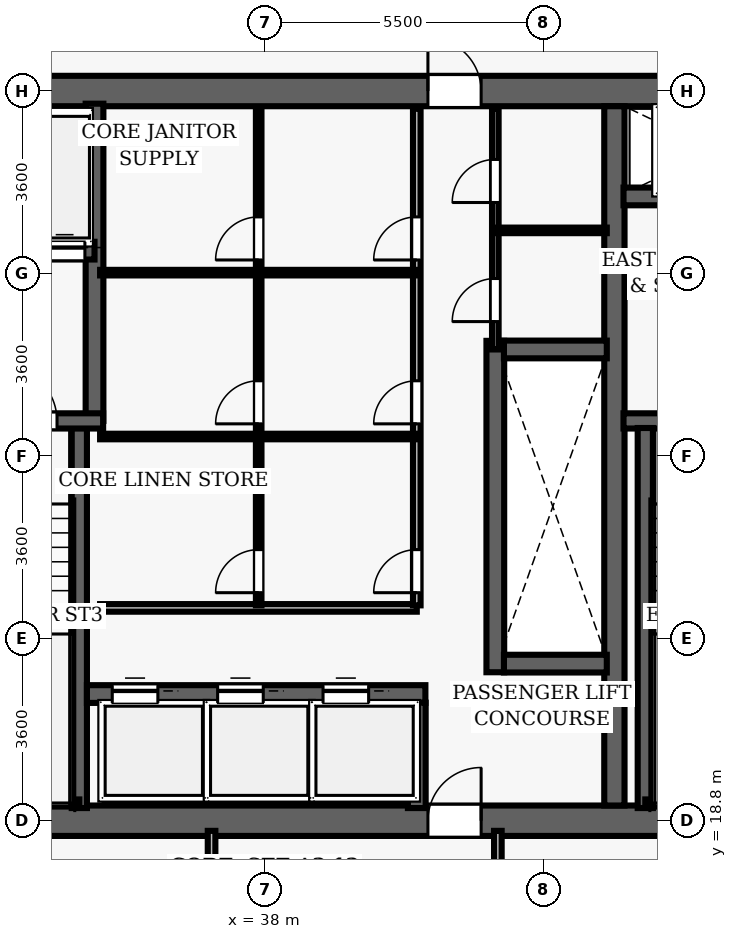
"""IFC4 building model, lengths in metres.
Left out: names, types, materials, properties, quantities, classifications, styles, units other than length and angle.
Written with IfcOpenShell. Run it as: python <this file> out.ifc"""

import sys

from ifc_helpers import new_model, si_unit, direction, frame, frame_2d, origin, place, context, subcontext, project, spatial, rectangle, extrude, element, fill, save


model = new_model("IFC4")
c1 = context("Model", 3, precision=1e-05, world=origin(), true_north=direction((0.0, 1.0)))
c2 = subcontext(c1, "Body", "Model", "MODEL_VIEW")
j1 = project(units=[si_unit("LENGTHUNIT", "METRE"), si_unit("PLANEANGLEUNIT", "RADIAN")], contexts=[c1])
p1 = place(None, origin())
s1 = spatial("IfcSite", under=j1, at=p1, CompositionType="ELEMENT")
p2 = place(p1, origin())
s2 = spatial("IfcBuilding", under=s1, at=p2, CompositionType="ELEMENT")
p3 = place(p2, frame((0.0, 0.0, 130.8)))
s3 = spatial("IfcBuildingStorey", under=s2, at=p3, CompositionType="ELEMENT", Elevation=130.8)
p4 = place(p3, frame((26.7, 18.8, 0.0), z_axis=(0.0, 0.0, 1.0), x_axis=(1.0, 0.0, 0.0)))
e1 = element("IfcWall", 1, at=p4, inside=s3, PredefinedType="SHEAR", context=c2, shape_type="SweptSolid", body=[
    extrude(rectangle(XDim=22.6, YDim=0.6, at=frame_2d((11.3, 0.0))), origin(), (0.0, 0.0, 1.0), 3.5),
])
p5 = place(p4, frame((14.52, 0.0, 0.0)))
e2 = element("IfcOpeningElement", 2, at=p5, cuts=e1, PredefinedType="OPENING", context=c2, shape_type="SweptSolid", body=[
    extrude(rectangle(XDim=1.05, YDim=2.15, at=frame_2d((0.525, 1.075))), frame((0.0, 0.31, 0.0), z_axis=(0.0, -1.0, 0.0), x_axis=(1.0, 0.0, 0.0)), (0.0, 0.0, 1.0), 0.62),
])
p6 = place(p3, frame((26.7, 33.2, 0.0), z_axis=(0.0, 0.0, 1.0), x_axis=(1.0, 0.0, 0.0)))
e3 = element("IfcWall", 3, at=p6, inside=s3, PredefinedType="SHEAR", context=c2, shape_type="SweptSolid", body=[
    extrude(rectangle(XDim=22.6, YDim=0.6, at=frame_2d((11.3, 0.0))), origin(), (0.0, 0.0, 1.0), 3.5),
])
p7 = place(p6, frame((4.62, 0.0, 0.0)))
e4 = element("IfcOpeningElement", 4, at=p7, cuts=e3, PredefinedType="OPENING", context=c2, shape_type="SweptSolid", body=[
    extrude(rectangle(XDim=1.05, YDim=2.15, at=frame_2d((0.525, 1.075))), frame((0.0, 0.31, 0.0), z_axis=(0.0, -1.0, 0.0), x_axis=(1.0, 0.0, 0.0)), (0.0, 0.0, 1.0), 0.62),
])
p8 = place(p6, frame((14.52, 0.0, 0.0)))
e5 = element("IfcOpeningElement", 5, at=p8, cuts=e3, PredefinedType="OPENING", context=c2, shape_type="SweptSolid", body=[
    extrude(rectangle(XDim=1.05, YDim=2.15, at=frame_2d((0.525, 1.075))), frame((0.0, 0.31, 0.0), z_axis=(0.0, -1.0, 0.0), x_axis=(1.0, 0.0, 0.0)), (0.0, 0.0, 1.0), 0.62),
])
p9 = place(p3, frame((44.9, 19.1, 0.0), z_axis=(0.0, 0.0, 1.0), x_axis=(0.0, 1.0, 0.0)))
e6 = element("IfcWall", 6, at=p9, inside=s3, PredefinedType="SHEAR", context=c2, shape_type="SweptSolid", body=[
    extrude(rectangle(XDim=13.8, YDim=0.4, at=frame_2d((6.9, 0.0))), origin(), (0.0, 0.0, 1.0), 3.5),
])
p10 = place(p3, frame((45.08, 26.69, 0.0), z_axis=(0.0, 0.0, 1.0), x_axis=(1.0, 0.0, 0.0)))
e7 = element("IfcWall", 7, at=p10, inside=s3, PredefinedType="SHEAR", context=c2, shape_type="SweptSolid", body=[
    extrude(rectangle(XDim=3.67, YDim=0.3, at=frame_2d((1.835, 0.0))), origin(), (0.0, 0.0, 1.0), 3.5),
])
p11 = place(p10, frame((1.05, 0.0, 0.0)))
e8 = element("IfcOpeningElement", 8, at=p11, cuts=e7, PredefinedType="OPENING", context=c2, shape_type="SweptSolid", body=[
    extrude(rectangle(XDim=1.1, YDim=2.15, at=frame_2d((0.55, 1.075))), frame((0.0, 0.16, 0.0), z_axis=(0.0, -1.0, 0.0), x_axis=(1.0, 0.0, 0.0)), (0.0, 0.0, 1.0), 0.32),
])
p12 = place(p3, frame((45.51, 19.05, 0.0), z_axis=(0.0, 0.0, 1.0), x_axis=(0.0, 1.0, 0.0)))
e9 = element("IfcWall", 9, at=p12, inside=s3, PredefinedType="SHEAR", context=c2, shape_type="SweptSolid", body=[
    extrude(rectangle(XDim=7.5, YDim=0.3, at=frame_2d((3.75, 0.0))), origin(), (0.0, 0.0, 1.0), 3.5),
])
p13 = place(p3, frame((45.51, 19.16, 0.0), z_axis=(0.0, 0.0, 1.0), x_axis=(1.0, 0.0, 0.0)))
e10 = element("IfcWall", 10, at=p13, inside=s3, PredefinedType="SHEAR", context=c2, shape_type="SweptSolid", body=[
    extrude(rectangle(XDim=3.095, YDim=0.12, at=frame_2d((1.547, 0.0))), origin(), (0.0, 0.0, 1.0), 3.5),
])
p14 = place(p3, frame((45.08, 31.12, 0.0), z_axis=(0.0, 0.0, 1.0), x_axis=(1.0, 0.0, 0.0)))
e11 = element("IfcWall", 11, at=p14, inside=s3, PredefinedType="SHEAR", context=c2, shape_type="SweptSolid", body=[
    extrude(rectangle(XDim=3.67, YDim=0.35, at=frame_2d((1.835, 0.0))), origin(), (0.0, 0.0, 1.0), 2.675),
])
p15 = place(p14, frame((1.25, 0.0, 0.0)))
e12 = element("IfcOpeningElement", 12, at=p15, cuts=e11, PredefinedType="OPENING", context=c2, shape_type="SweptSolid", body=[
    extrude(rectangle(XDim=1.1, YDim=2.15, at=frame_2d((0.55, 1.075))), frame((0.0, 0.185, 0.0), z_axis=(0.0, -1.0, 0.0), x_axis=(1.0, 0.0, 0.0)), (0.0, 0.0, 1.0), 0.37),
])
p16 = place(p3, frame((34.34, 19.05, 0.0), z_axis=(0.0, 0.0, 1.0), x_axis=(0.0, 1.0, 0.0)))
e13 = element("IfcWall", 13, at=p16, inside=s3, PredefinedType="SHEAR", context=c2, shape_type="SweptSolid", body=[
    extrude(rectangle(XDim=7.5, YDim=0.3, at=frame_2d((3.75, 0.0))), origin(), (0.0, 0.0, 1.0), 3.5),
])
p17 = place(p3, frame((34.64, 26.69, 0.0), z_axis=(0.0, 0.0, 1.0), x_axis=(0.0, 1.0, 0.0)))
e14 = element("IfcWall", 14, at=p17, inside=s3, PredefinedType="SHEAR", context=c2, shape_type="SweptSolid", body=[
    extrude(rectangle(XDim=6.26, YDim=0.35, at=frame_2d((3.13, 0.0))), origin(), (0.0, 0.0, 1.0), 3.5),
])
p18 = place(p3, frame((31.25, 26.69, 0.0), z_axis=(0.0, 0.0, 1.0), x_axis=(1.0, 0.0, 0.0)))
e15 = element("IfcWall", 15, at=p18, inside=s3, PredefinedType="SHEAR", context=c2, shape_type="SweptSolid", body=[
    extrude(rectangle(XDim=3.56, YDim=0.3, at=frame_2d((1.78, 0.0))), origin(), (0.0, 0.0, 1.0), 3.5),
])
p19 = place(p18, frame((1.55, 0.0, 0.0)))
e16 = element("IfcOpeningElement", 16, at=p19, cuts=e15, PredefinedType="OPENING", context=c2, shape_type="SweptSolid", body=[
    extrude(rectangle(XDim=1.1, YDim=2.15, at=frame_2d((0.55, 1.075))), frame((0.0, 0.16, 0.0), z_axis=(0.0, -1.0, 0.0), x_axis=(1.0, 0.0, 0.0)), (0.0, 0.0, 1.0), 0.32),
])
p20 = place(p3, frame((31.3, 19.16, 0.0), z_axis=(0.0, 0.0, 1.0), x_axis=(1.0, 0.0, 0.0)))
e17 = element("IfcWall", 17, at=p20, inside=s3, PredefinedType="SHEAR", context=c2, shape_type="SweptSolid", body=[
    extrude(rectangle(XDim=3.04, YDim=0.12, at=frame_2d((1.52, 0.0))), origin(), (0.0, 0.0, 1.0), 3.5),
])
p21 = place(p3, frame((32.23, 30.05, 0.0), z_axis=(0.0, 0.0, 1.0), x_axis=(1.0, 0.0, 0.0)))
e18 = element("IfcWall", 18, at=p21, inside=s3, PredefinedType="SHEAR", context=c2, shape_type="SweptSolid", body=[
    extrude(rectangle(XDim=2.41, YDim=0.35, at=frame_2d((1.205, 0.0))), origin(), (0.0, 0.0, 1.0), 2.675),
])
p22 = place(p21, frame((0.42, 0.0, 0.0)))
e19 = element("IfcOpeningElement", 19, at=p22, cuts=e18, PredefinedType="OPENING", context=c2, shape_type="SweptSolid", body=[
    extrude(rectangle(XDim=0.8, YDim=2.15, at=frame_2d((0.4, 1.075))), frame((0.0, 0.185, 0.0), z_axis=(0.0, -1.0, 0.0), x_axis=(1.0, 0.0, 0.0)), (0.0, 0.0, 1.0), 0.37),
])
p23 = place(p21, frame((1.42, 0.0, 0.0)))
e20 = element("IfcOpeningElement", 20, at=p23, cuts=e18, PredefinedType="OPENING", context=c2, shape_type="SweptSolid", body=[
    extrude(rectangle(XDim=0.8, YDim=2.15, at=frame_2d((0.4, 1.075))), frame((0.0, 0.185, 0.0), z_axis=(0.0, -1.0, 0.0), x_axis=(1.0, 0.0, 0.0)), (0.0, 0.0, 1.0), 0.37),
])
p24 = place(p3, frame((42.55, 21.73, 0.0), z_axis=(0.0, 0.0, 1.0), x_axis=(0.0, 1.0, 0.0)))
e21 = element("IfcWall", 21, at=p24, inside=s3, PredefinedType="SHEAR", context=c2, shape_type="SweptSolid", body=[
    extrude(rectangle(XDim=6.54, YDim=0.35, at=frame_2d((3.27, 0.0))), origin(), (0.0, 0.0, 1.0), 2.675),
])
for number, where, z_axis, x_axis in (
    (22, (42.72, 21.9, 0.0), (0.0, 0.0, 1.0), (1.0, 0.0, 0.0)),
    (23, (42.72, 28.1, 0.0), (0.0, 0.0, 1.0), (1.0, 0.0, 0.0)),
):
    element("IfcWall", number, at=place(p3, frame(where, z_axis=z_axis, x_axis=x_axis)), inside=s3, PredefinedType="SHEAR", context=c2, shape_type="SweptSolid", body=[
        extrude(rectangle(XDim=2.03, YDim=0.35, at=frame_2d((1.015, 0.0))), origin(), (0.0, 0.0, 1.0), 2.675),
    ])
p25 = place(p3, frame((34.49, 21.3, 0.0), z_axis=(0.0, 0.0, 1.0), x_axis=(1.0, 0.0, 0.0)))
e24 = element("IfcWall", 24, at=p25, inside=s3, PredefinedType="SHEAR", context=c2, shape_type="SweptSolid", body=[
    extrude(rectangle(XDim=6.68, YDim=0.35, at=frame_2d((3.34, 0.0))), origin(), (0.0, 0.0, 1.0), 2.675),
])
p26 = place(p25, frame((0.5, 0.0, 0.0)))
e25 = element("IfcOpeningElement", 25, at=p26, cuts=e24, PredefinedType="OPENING", context=c2, shape_type="SweptSolid", body=[
    extrude(rectangle(XDim=0.9, YDim=2.15, at=frame_2d((0.45, 1.075))), frame((0.0, 0.185, 0.0), z_axis=(0.0, -1.0, 0.0), x_axis=(1.0, 0.0, 0.0)), (0.0, 0.0, 1.0), 0.37),
])
p27 = place(p25, frame((2.58, 0.0, 0.0)))
e26 = element("IfcOpeningElement", 26, at=p27, cuts=e24, PredefinedType="OPENING", context=c2, shape_type="SweptSolid", body=[
    extrude(rectangle(XDim=0.9, YDim=2.15, at=frame_2d((0.45, 1.075))), frame((0.0, 0.185, 0.0), z_axis=(0.0, -1.0, 0.0), x_axis=(1.0, 0.0, 0.0)), (0.0, 0.0, 1.0), 0.37),
])
p28 = place(p25, frame((4.66, 0.0, 0.0)))
e27 = element("IfcOpeningElement", 27, at=p28, cuts=e24, PredefinedType="OPENING", context=c2, shape_type="SweptSolid", body=[
    extrude(rectangle(XDim=0.9, YDim=2.15, at=frame_2d((0.45, 1.075))), frame((0.0, 0.185, 0.0), z_axis=(0.0, -1.0, 0.0), x_axis=(1.0, 0.0, 0.0)), (0.0, 0.0, 1.0), 0.37),
])
p29 = place(p3, frame((41.0, 19.05, 0.0), z_axis=(0.0, 0.0, 1.0), x_axis=(0.0, 1.0, 0.0)))
e28 = element("IfcWall", 28, at=p29, inside=s3, PredefinedType="SHEAR", context=c2, shape_type="SweptSolid", body=[
    extrude(rectangle(XDim=2.08, YDim=0.35, at=frame_2d((1.04, 0.0))), origin(), (0.0, 0.0, 1.0), 2.675),
])
p30 = place(p3, frame((34.75, 23.0, 0.0), z_axis=(0.0, 0.0, 1.0), x_axis=(1.0, 0.0, 0.0)))
e29 = element("IfcWall", 29, at=p30, inside=s3, PredefinedType="PARTITIONING", context=c2, shape_type="SweptSolid", body=[
    extrude(rectangle(XDim=6.25, YDim=0.15, at=frame_2d((3.125, 0.0))), origin(), (0.0, 0.0, 1.0), 2.675),
])
p31 = place(p3, frame((41.0, 23.05, 0.0), z_axis=(0.0, 0.0, 1.0), x_axis=(0.0, 1.0, 0.0)))
e30 = element("IfcWall", 30, at=p31, inside=s3, PredefinedType="PARTITIONING", context=c2, shape_type="SweptSolid", body=[
    extrude(rectangle(XDim=9.8, YDim=0.15, at=frame_2d((4.9, 0.0))), origin(), (0.0, 0.0, 1.0), 2.675),
])
p32 = place(p31, frame((0.25, 0.0, 0.0)))
e31 = element("IfcOpeningElement", 31, at=p32, cuts=e30, PredefinedType="OPENING", context=c2, shape_type="SweptSolid", body=[
    extrude(rectangle(XDim=0.85, YDim=2.1, at=frame_2d((0.425, 1.05))), frame((0.0, 0.085, 0.0), z_axis=(0.0, -1.0, 0.0), x_axis=(1.0, 0.0, 0.0)), (0.0, 0.0, 1.0), 0.17),
])
p33 = place(p31, frame((3.582, 0.0, 0.0)))
e32 = element("IfcOpeningElement", 32, at=p33, cuts=e30, PredefinedType="OPENING", context=c2, shape_type="SweptSolid", body=[
    extrude(rectangle(XDim=0.85, YDim=2.1, at=frame_2d((0.425, 1.05))), frame((0.0, 0.085, 0.0), z_axis=(0.0, -1.0, 0.0), x_axis=(1.0, 0.0, 0.0)), (0.0, 0.0, 1.0), 0.17),
])
p34 = place(p31, frame((6.816, 0.0, 0.0)))
e33 = element("IfcOpeningElement", 33, at=p34, cuts=e30, PredefinedType="OPENING", context=c2, shape_type="SweptSolid", body=[
    extrude(rectangle(XDim=0.85, YDim=2.1, at=frame_2d((0.425, 1.05))), frame((0.0, 0.085, 0.0), z_axis=(0.0, -1.0, 0.0), x_axis=(1.0, 0.0, 0.0)), (0.0, 0.0, 1.0), 0.17),
])
p35 = place(p3, frame((37.88, 23.05, 0.0), z_axis=(0.0, 0.0, 1.0), x_axis=(0.0, 1.0, 0.0)))
e34 = element("IfcWall", 34, at=p35, inside=s3, PredefinedType="PARTITIONING", context=c2, shape_type="SweptSolid", body=[
    extrude(rectangle(XDim=9.8, YDim=0.11, at=frame_2d((4.9, 0.0))), origin(), (0.0, 0.0, 1.0), 2.675),
])
p36 = place(p35, frame((0.25, 0.0, 0.0)))
e35 = element("IfcOpeningElement", 35, at=p36, cuts=e34, PredefinedType="OPENING", context=c2, shape_type="SweptSolid", body=[
    extrude(rectangle(XDim=0.85, YDim=2.1, at=frame_2d((0.425, 1.05))), frame((0.0, 0.065, 0.0), z_axis=(0.0, -1.0, 0.0), x_axis=(1.0, 0.0, 0.0)), (0.0, 0.0, 1.0), 0.13),
])
p37 = place(p35, frame((3.582, 0.0, 0.0)))
e36 = element("IfcOpeningElement", 36, at=p37, cuts=e34, PredefinedType="OPENING", context=c2, shape_type="SweptSolid", body=[
    extrude(rectangle(XDim=0.85, YDim=2.1, at=frame_2d((0.425, 1.05))), frame((0.0, 0.065, 0.0), z_axis=(0.0, -1.0, 0.0), x_axis=(1.0, 0.0, 0.0)), (0.0, 0.0, 1.0), 0.13),
])
p38 = place(p35, frame((6.816, 0.0, 0.0)))
e37 = element("IfcOpeningElement", 37, at=p38, cuts=e34, PredefinedType="OPENING", context=c2, shape_type="SweptSolid", body=[
    extrude(rectangle(XDim=0.85, YDim=2.1, at=frame_2d((0.425, 1.05))), frame((0.0, 0.065, 0.0), z_axis=(0.0, -1.0, 0.0), x_axis=(1.0, 0.0, 0.0)), (0.0, 0.0, 1.0), 0.13),
])
for number, where, z_axis, x_axis in (
    (38, (34.75, 26.382, 0.0), (0.0, 0.0, 1.0), (1.0, 0.0, 0.0)),
    (39, (34.75, 29.616, 0.0), (0.0, 0.0, 1.0), (1.0, 0.0, 0.0)),
):
    element("IfcWall", number, at=place(p3, frame(where, z_axis=z_axis, x_axis=x_axis)), inside=s3, PredefinedType="PARTITIONING", context=c2, shape_type="SweptSolid", body=[
        extrude(rectangle(XDim=6.25, YDim=0.11, at=frame_2d((3.125, 0.0))), origin(), (0.0, 0.0, 1.0), 2.675),
    ])
p39 = place(p3, frame((42.55, 28.1, 0.0), z_axis=(0.0, 0.0, 1.0), x_axis=(0.0, 1.0, 0.0)))
e40 = element("IfcWall", 40, at=p39, inside=s3, PredefinedType="PARTITIONING", context=c2, shape_type="SweptSolid", body=[
    extrude(rectangle(XDim=4.75, YDim=0.13, at=frame_2d((2.375, 0.0))), origin(), (0.0, 0.0, 1.0), 2.675),
])
p40 = place(p39, frame((0.55, 0.0, 0.0)))
e41 = element("IfcOpeningElement", 41, at=p40, cuts=e40, PredefinedType="OPENING", context=c2, shape_type="SweptSolid", body=[
    extrude(rectangle(XDim=0.85, YDim=2.1, at=frame_2d((0.425, 1.05))), frame((0.0, 0.075, 0.0), z_axis=(0.0, -1.0, 0.0), x_axis=(1.0, 0.0, 0.0)), (0.0, 0.0, 1.0), 0.15),
])
p41 = place(p39, frame((2.9, 0.0, 0.0)))
e42 = element("IfcOpeningElement", 42, at=p41, cuts=e40, PredefinedType="OPENING", context=c2, shape_type="SweptSolid", body=[
    extrude(rectangle(XDim=0.85, YDim=2.1, at=frame_2d((0.425, 1.05))), frame((0.0, 0.075, 0.0), z_axis=(0.0, -1.0, 0.0), x_axis=(1.0, 0.0, 0.0)), (0.0, 0.0, 1.0), 0.15),
])
p42 = place(p3, frame((42.55, 30.45, 0.0), z_axis=(0.0, 0.0, 1.0), x_axis=(1.0, 0.0, 0.0)))
e43 = element("IfcWall", 43, at=p42, inside=s3, PredefinedType="PARTITIONING", context=c2, shape_type="SweptSolid", body=[
    extrude(rectangle(XDim=2.2, YDim=0.11, at=frame_2d((1.1, 0.0))), origin(), (0.0, 0.0, 1.0), 2.675),
])
p43 = place(p3, frame((36.95, 11.2, 0.0), z_axis=(0.0, 0.0, 1.0), x_axis=(0.0, 1.0, 0.0)))
e44 = element("IfcWall", 44, at=p43, inside=s3, PredefinedType="PARTITIONING", context=c2, shape_type="SweptSolid", body=[
    extrude(rectangle(XDim=7.4, YDim=0.15, at=frame_2d((3.7, 0.0))), origin(), (0.0, 0.0, 1.0), 2.675),
])
p44 = place(p43, frame((5.075, 0.0, 0.0)))
e45 = element("IfcOpeningElement", 45, at=p44, cuts=e44, PredefinedType="OPENING", context=c2, shape_type="SweptSolid", body=[
    extrude(rectangle(XDim=0.95, YDim=2.15, at=frame_2d((0.475, 1.075))), frame((0.0, 0.085, 0.0), z_axis=(0.0, -1.0, 0.0), x_axis=(1.0, 0.0, 0.0)), (0.0, 0.0, 1.0), 0.17),
])
p45 = place(p3, frame((42.6, 16.65, 0.0), z_axis=(0.0, 0.0, 1.0), x_axis=(0.0, 1.0, 0.0)))
e46 = element("IfcWall", 46, at=p45, inside=s3, PredefinedType="PARTITIONING", context=c2, shape_type="SweptSolid", body=[
    extrude(rectangle(XDim=1.95, YDim=0.15, at=frame_2d((0.975, 0.0))), origin(), (0.0, 0.0, 1.0), 2.675),
])
p46 = place(p19, origin())
e47 = element("IfcDoor", 47, at=p46, inside=s3, OperationType="SINGLE_SWING_LEFT", PredefinedType="DOOR", context=c2, shape_type="SweptSolid", body=[
    extrude(rectangle(XDim=1.1, YDim=2.15, at=frame_2d((0.55, 1.075))), frame((0.0, 0.025, 0.0), z_axis=(0.0, -1.0, 0.0), x_axis=(1.0, 0.0, 0.0)), (0.0, 0.0, 1.0), 0.05),
])
fill(e16, e47)
p47 = place(p8, origin())
e48 = element("IfcDoor", 48, at=p47, inside=s3, OperationType="SINGLE_SWING_LEFT", PredefinedType="DOOR", context=c2, shape_type="SweptSolid", body=[
    extrude(rectangle(XDim=1.05, YDim=2.15, at=frame_2d((0.525, 1.075))), frame((0.0, 0.025, 0.0), z_axis=(0.0, -1.0, 0.0), x_axis=(1.0, 0.0, 0.0)), (0.0, 0.0, 1.0), 0.05),
])
fill(e5, e48)
p48 = place(p5, origin())
e49 = element("IfcDoor", 49, at=p48, inside=s3, OperationType="SINGLE_SWING_RIGHT", PredefinedType="DOOR", context=c2, shape_type="SweptSolid", body=[
    extrude(rectangle(XDim=1.05, YDim=2.15, at=frame_2d((0.525, 1.075))), frame((0.0, 0.025, 0.0), z_axis=(0.0, -1.0, 0.0), x_axis=(1.0, 0.0, 0.0)), (0.0, 0.0, 1.0), 0.05),
])
fill(e2, e49)
p49 = place(p32, origin())
e50 = element("IfcDoor", 50, at=p49, inside=s3, OperationType="SINGLE_SWING_LEFT", PredefinedType="DOOR", context=c2, shape_type="SweptSolid", body=[
    extrude(rectangle(XDim=0.85, YDim=2.1, at=frame_2d((0.425, 1.05))), frame((0.0, 0.025, 0.0), z_axis=(0.0, -1.0, 0.0), x_axis=(1.0, 0.0, 0.0)), (0.0, 0.0, 1.0), 0.05),
])
fill(e31, e50)
p50 = place(p36, origin())
e51 = element("IfcDoor", 51, at=p50, inside=s3, OperationType="SINGLE_SWING_LEFT", PredefinedType="DOOR", context=c2, shape_type="SweptSolid", body=[
    extrude(rectangle(XDim=0.85, YDim=2.1, at=frame_2d((0.425, 1.05))), frame((0.0, 0.025, 0.0), z_axis=(0.0, -1.0, 0.0), x_axis=(1.0, 0.0, 0.0)), (0.0, 0.0, 1.0), 0.05),
])
fill(e35, e51)
p51 = place(p33, origin())
e52 = element("IfcDoor", 52, at=p51, inside=s3, OperationType="SINGLE_SWING_LEFT", PredefinedType="DOOR", context=c2, shape_type="SweptSolid", body=[
    extrude(rectangle(XDim=0.85, YDim=2.1, at=frame_2d((0.425, 1.05))), frame((0.0, 0.025, 0.0), z_axis=(0.0, -1.0, 0.0), x_axis=(1.0, 0.0, 0.0)), (0.0, 0.0, 1.0), 0.05),
])
fill(e32, e52)
p52 = place(p37, origin())
e53 = element("IfcDoor", 53, at=p52, inside=s3, OperationType="SINGLE_SWING_LEFT", PredefinedType="DOOR", context=c2, shape_type="SweptSolid", body=[
    extrude(rectangle(XDim=0.85, YDim=2.1, at=frame_2d((0.425, 1.05))), frame((0.0, 0.025, 0.0), z_axis=(0.0, -1.0, 0.0), x_axis=(1.0, 0.0, 0.0)), (0.0, 0.0, 1.0), 0.05),
])
fill(e36, e53)
p53 = place(p34, origin())
e54 = element("IfcDoor", 54, at=p53, inside=s3, OperationType="SINGLE_SWING_LEFT", PredefinedType="DOOR", context=c2, shape_type="SweptSolid", body=[
    extrude(rectangle(XDim=0.85, YDim=2.1, at=frame_2d((0.425, 1.05))), frame((0.0, 0.025, 0.0), z_axis=(0.0, -1.0, 0.0), x_axis=(1.0, 0.0, 0.0)), (0.0, 0.0, 1.0), 0.05),
])
fill(e33, e54)
p54 = place(p38, origin())
e55 = element("IfcDoor", 55, at=p54, inside=s3, OperationType="SINGLE_SWING_LEFT", PredefinedType="DOOR", context=c2, shape_type="SweptSolid", body=[
    extrude(rectangle(XDim=0.85, YDim=2.1, at=frame_2d((0.425, 1.05))), frame((0.0, 0.025, 0.0), z_axis=(0.0, -1.0, 0.0), x_axis=(1.0, 0.0, 0.0)), (0.0, 0.0, 1.0), 0.05),
])
fill(e37, e55)
p55 = place(p40, origin())
e56 = element("IfcDoor", 56, at=p55, inside=s3, OperationType="SINGLE_SWING_LEFT", PredefinedType="DOOR", context=c2, shape_type="SweptSolid", body=[
    extrude(rectangle(XDim=0.85, YDim=2.1, at=frame_2d((0.425, 1.05))), frame((0.0, 0.025, 0.0), z_axis=(0.0, -1.0, 0.0), x_axis=(1.0, 0.0, 0.0)), (0.0, 0.0, 1.0), 0.05),
])
fill(e41, e56)
p56 = place(p41, origin())
e57 = element("IfcDoor", 57, at=p56, inside=s3, OperationType="SINGLE_SWING_LEFT", PredefinedType="DOOR", context=c2, shape_type="SweptSolid", body=[
    extrude(rectangle(XDim=0.85, YDim=2.1, at=frame_2d((0.425, 1.05))), frame((0.0, 0.025, 0.0), z_axis=(0.0, -1.0, 0.0), x_axis=(1.0, 0.0, 0.0)), (0.0, 0.0, 1.0), 0.05),
])
fill(e42, e57)
p57 = place(p26, origin())
e58 = element("IfcDoor", 58, at=p57, inside=s3, OperationType="SLIDING_TO_LEFT", PredefinedType="DOOR", context=c2, shape_type="SweptSolid", body=[
    extrude(rectangle(XDim=0.9, YDim=2.15, at=frame_2d((0.45, 1.075))), frame((0.0, 0.025, 0.0), z_axis=(0.0, -1.0, 0.0), x_axis=(1.0, 0.0, 0.0)), (0.0, 0.0, 1.0), 0.05),
])
fill(e25, e58)
p58 = place(p27, origin())
e59 = element("IfcDoor", 59, at=p58, inside=s3, OperationType="SLIDING_TO_LEFT", PredefinedType="DOOR", context=c2, shape_type="SweptSolid", body=[
    extrude(rectangle(XDim=0.9, YDim=2.15, at=frame_2d((0.45, 1.075))), frame((0.0, 0.025, 0.0), z_axis=(0.0, -1.0, 0.0), x_axis=(1.0, 0.0, 0.0)), (0.0, 0.0, 1.0), 0.05),
])
fill(e26, e59)
p59 = place(p28, origin())
e60 = element("IfcDoor", 60, at=p59, inside=s3, OperationType="SLIDING_TO_LEFT", PredefinedType="DOOR", context=c2, shape_type="SweptSolid", body=[
    extrude(rectangle(XDim=0.9, YDim=2.15, at=frame_2d((0.45, 1.075))), frame((0.0, 0.025, 0.0), z_axis=(0.0, -1.0, 0.0), x_axis=(1.0, 0.0, 0.0)), (0.0, 0.0, 1.0), 0.05),
])
fill(e27, e60)
p60 = place(p23, origin())
e61 = element("IfcDoor", 61, at=p60, inside=s3, OperationType="SLIDING_TO_LEFT", PredefinedType="DOOR", context=c2, shape_type="SweptSolid", body=[
    extrude(rectangle(XDim=0.8, YDim=2.15, at=frame_2d((0.4, 1.075))), frame((0.0, 0.025, 0.0), z_axis=(0.0, -1.0, 0.0), x_axis=(1.0, 0.0, 0.0)), (0.0, 0.0, 1.0), 0.05),
])
fill(e20, e61)
save(model, sys.argv[1])
